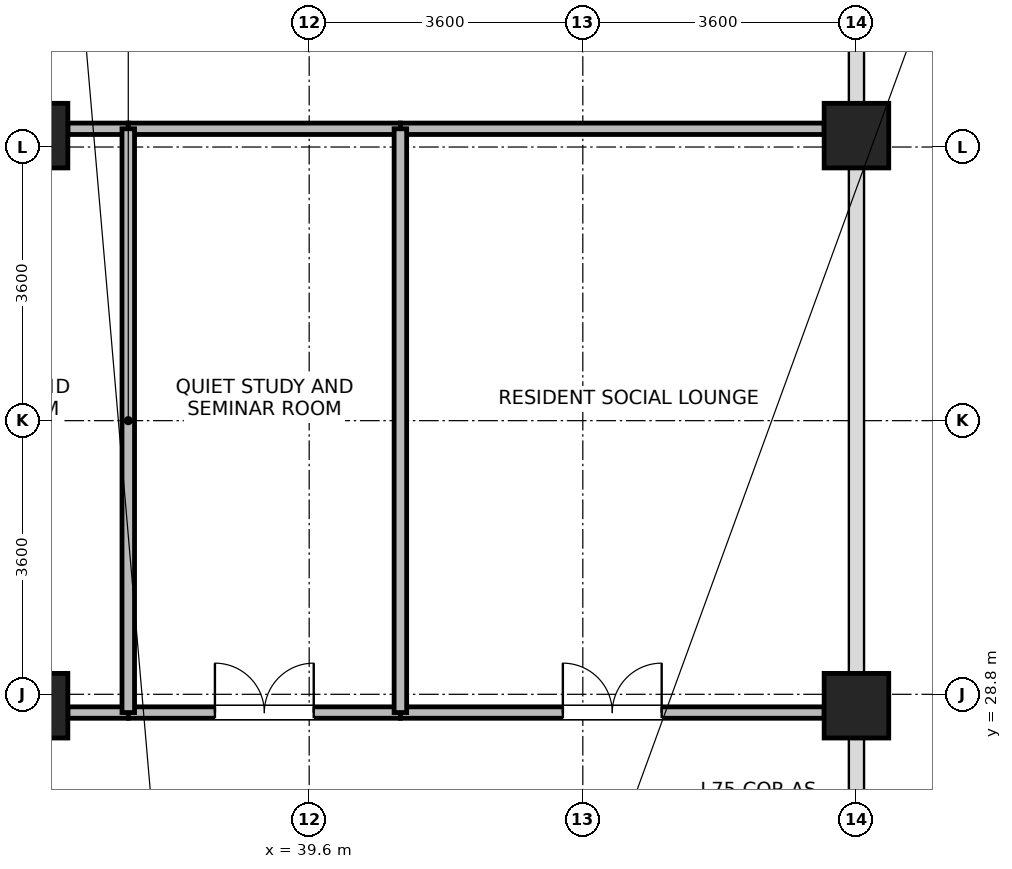
"""IFC4 building model, lengths in metres.
Left out: names, types, materials, properties, quantities, classifications, styles, units other than length and angle.
Written with IfcOpenShell. Run it as: python <this file> out.ifc"""

import sys

from ifc_helpers import new_model, si_unit, direction, frame, frame_2d, origin, origin_2d, place, context, subcontext, project, spatial, rectangle, extrude, source, transform, mapped, element, fill, save


model = new_model("IFC4")
c1 = context("Model", 3, precision=1e-05, world=origin(), true_north=direction((0.0, 1.0)))
c2 = subcontext(c1, "Body", "Model", "MODEL_VIEW")
j1 = project(units=[si_unit("LENGTHUNIT", "METRE"), si_unit("PLANEANGLEUNIT", "RADIAN")], contexts=[c1])
p1 = place(None, origin())
s1 = spatial("IfcSite", under=j1, at=p1, CompositionType="ELEMENT")
p2 = place(p1, origin())
s2 = spatial("IfcBuilding", under=s1, at=p2, CompositionType="ELEMENT")
p3 = place(p2, frame((0.0, 0.0, 290.6)))
s3 = spatial("IfcBuildingStorey", under=s2, at=p3, CompositionType="ELEMENT", Elevation=290.6)
m1 = source(origin(), c2, "Body", "SweptSolid", [
    extrude(rectangle(XDim=0.85, YDim=0.85, at=origin_2d()), origin(), (0.0, 0.0, 1.0), 3.7),
])
for number, where, z_axis, x_axis in (
    (1, (36.0, 28.65, 0.0), (0.0, 0.0, 1.0), (1.0, 0.0, 0.0)),
    (2, (36.0, 36.15, 0.0), (0.0, 0.0, 1.0), (1.0, 0.0, 0.0)),
    (3, (46.8, 28.65, 0.0), (0.0, 0.0, 1.0), (1.0, 0.0, 0.0)),
    (4, (46.8, 36.15, 0.0), (0.0, 0.0, 1.0), (1.0, 0.0, 0.0)),
):
    element("IfcColumn", number, at=place(p3, frame(where, z_axis=z_axis, x_axis=x_axis)), inside=s3, PredefinedType="COLUMN", context=c2, shape_type="MappedRepresentation", body=[
        mapped(m1, transform((0.0, 0.0, 0.0), x_axis=(1.0, 0.0, 0.0), y_axis=(0.0, 1.0, 0.0), z_axis=(0.0, 0.0, 1.0), scale=1.0)),
    ])
p4 = place(p3, frame((40.8, 28.56, 0.0), z_axis=(0.0, 0.0, 1.0), x_axis=(1.0, 0.0, 0.0)))
e5 = element("IfcWall", 5, at=p4, inside=s3, PredefinedType="PARTITIONING", context=c2, shape_type="SweptSolid", body=[
    extrude(rectangle(XDim=5.575, YDim=0.15, at=frame_2d((2.788, 0.0))), origin(), (0.0, 0.0, 1.0), 2.905),
])
p5 = place(p4, frame((2.137, 0.0, 0.0)))
e6 = element("IfcOpeningElement", 6, at=p5, cuts=e5, PredefinedType="OPENING", context=c2, shape_type="SweptSolid", body=[
    extrude(rectangle(XDim=1.3, YDim=2.12, at=frame_2d((0.65, 1.06))), frame((0.0, 0.085, 0.0), z_axis=(0.0, -1.0, 0.0), x_axis=(1.0, 0.0, 0.0)), (0.0, 0.0, 1.0), 0.17),
])
p6 = place(p3, frame((40.8, 36.24, 0.0), z_axis=(0.0, 0.0, 1.0), x_axis=(1.0, 0.0, 0.0)))
e7 = element("IfcWall", 7, at=p6, inside=s3, PredefinedType="PARTITIONING", context=c2, shape_type="SweptSolid", body=[
    extrude(rectangle(XDim=5.575, YDim=0.15, at=frame_2d((2.788, 0.0))), origin(), (0.0, 0.0, 1.0), 2.905),
])
for number, where, z_axis, x_axis in (
    (8, (36.425, 28.56, 0.0), (0.0, 0.0, 1.0), (1.0, 0.0, 0.0)),
    (9, (36.425, 36.24, 0.0), (0.0, 0.0, 1.0), (1.0, 0.0, 0.0)),
):
    element("IfcWall", number, at=place(p3, frame(where, z_axis=z_axis, x_axis=x_axis)), inside=s3, PredefinedType="PARTITIONING", context=c2, shape_type="SweptSolid", body=[
        extrude(rectangle(XDim=0.795, YDim=0.15, at=frame_2d((0.397, 0.0))), origin(), (0.0, 0.0, 1.0), 2.905),
    ])
p7 = place(p3, frame((37.22, 28.56, 0.0), z_axis=(0.0, 0.0, 1.0), x_axis=(1.0, 0.0, 0.0)))
e10 = element("IfcWall", 10, at=p7, inside=s3, PredefinedType="PARTITIONING", context=c2, shape_type="SweptSolid", body=[
    extrude(rectangle(XDim=3.58, YDim=0.15, at=frame_2d((1.79, 0.0))), origin(), (0.0, 0.0, 1.0), 2.905),
])
p8 = place(p7, frame((1.14, 0.0, 0.0)))
e11 = element("IfcOpeningElement", 11, at=p8, cuts=e10, PredefinedType="OPENING", context=c2, shape_type="SweptSolid", body=[
    extrude(rectangle(XDim=1.3, YDim=2.12, at=frame_2d((0.65, 1.06))), frame((0.0, 0.085, 0.0), z_axis=(0.0, -1.0, 0.0), x_axis=(1.0, 0.0, 0.0)), (0.0, 0.0, 1.0), 0.17),
])
p9 = place(p3, frame((37.22, 36.24, 0.0), z_axis=(0.0, 0.0, 1.0), x_axis=(1.0, 0.0, 0.0)))
e12 = element("IfcWall", 12, at=p9, inside=s3, PredefinedType="PARTITIONING", context=c2, shape_type="SweptSolid", body=[
    extrude(rectangle(XDim=3.58, YDim=0.15, at=frame_2d((1.79, 0.0))), origin(), (0.0, 0.0, 1.0), 2.905),
])
for number, where, z_axis, x_axis in (
    (13, (37.22, 28.56, 0.0), (0.0, 0.0, 1.0), (0.0, 1.0, 0.0)),
    (14, (40.8, 28.56, 0.0), (0.0, 0.0, 1.0), (0.0, 1.0, 0.0)),
):
    element("IfcWall", number, at=place(p3, frame(where, z_axis=z_axis, x_axis=x_axis)), inside=s3, PredefinedType="PARTITIONING", context=c2, shape_type="SweptSolid", body=[
        extrude(rectangle(XDim=7.68, YDim=0.165, at=frame_2d((3.84, 0.0))), origin(), (0.0, 0.0, 1.0), 3.455),
    ])
p10 = place(p5, origin())
e15 = element("IfcDoor", 15, at=p10, inside=s3, OperationType="DOUBLE_DOOR_SINGLE_SWING", PredefinedType="DOOR", context=c2, shape_type="SweptSolid", body=[
    extrude(rectangle(XDim=1.3, YDim=2.12, at=frame_2d((0.65, 1.06))), frame((0.0, 0.025, 0.0), z_axis=(0.0, -1.0, 0.0), x_axis=(1.0, 0.0, 0.0)), (0.0, 0.0, 1.0), 0.05),
])
fill(e6, e15)
p11 = place(p8, origin())
e16 = element("IfcDoor", 16, at=p11, inside=s3, OperationType="DOUBLE_DOOR_SINGLE_SWING", PredefinedType="DOOR", context=c2, shape_type="SweptSolid", body=[
    extrude(rectangle(XDim=1.3, YDim=2.12, at=frame_2d((0.65, 1.06))), frame((0.0, 0.025, 0.0), z_axis=(0.0, -1.0, 0.0), x_axis=(1.0, 0.0, 0.0)), (0.0, 0.0, 1.0), 0.05),
])
fill(e11, e16)
save(model, sys.argv[1])
